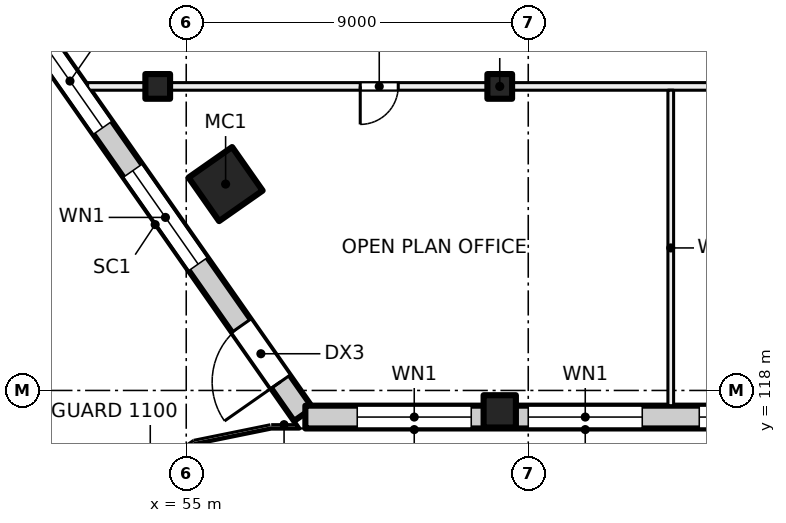
"""IFC4 building model, lengths in metres.
Left out: names, types, materials, properties, quantities, classifications, styles, units other than length and angle.
Written with IfcOpenShell. Run it as: python <this file> out.ifc"""

import sys

from ifc_helpers import new_model, si_unit, direction, frame, frame_2d, origin, origin_2d, place, context, subcontext, project, spatial, rectangle, hollow_rectangle, extrude, element, fill, save


model = new_model("IFC4")
c1 = context("Model", 3, precision=1e-05, world=origin(), true_north=direction((0.0, 1.0)))
c2 = subcontext(c1, "Body", "Model", "MODEL_VIEW")
j1 = project(units=[si_unit("LENGTHUNIT", "METRE"), si_unit("PLANEANGLEUNIT", "RADIAN")], contexts=[c1])
p1 = place(None, origin())
s1 = spatial("IfcSite", under=j1, at=p1, CompositionType="ELEMENT")
p2 = place(p1, origin())
s2 = spatial("IfcBuilding", under=s1, at=p2, CompositionType="ELEMENT")
p3 = place(p2, frame((0.0, 0.0, 105.0)))
s3 = spatial("IfcBuildingStorey", under=s2, at=p3, CompositionType="ELEMENT", Elevation=105.0)
p4 = place(p3, frame((56.036, 123.43, 0.0), z_axis=(0.0, 0.0, 1.0), x_axis=(0.573576436351, -0.819152044289, 0.0)))
e1 = element("IfcColumn", 1, at=p4, inside=s3, PredefinedType="COLUMN", context=c2, shape_type="SweptSolid", body=[
    extrude(hollow_rectangle(XDim=1.4, YDim=1.4, WallThickness=0.04, at=origin_2d()), origin(), (0.0, 0.0, 1.0), 4.0),
])
for number, where, z_axis, x_axis in (
    (2, (54.25, 126.0, 0.0), (0.0, 0.0, 1.0), (1.0, 0.0, 0.0)),
    (3, (63.25, 126.0, 0.0), (0.0, 0.0, 1.0), (1.0, 0.0, 0.0)),
):
    element("IfcColumn", number, at=place(p3, frame(where, z_axis=z_axis, x_axis=x_axis)), inside=s3, PredefinedType="COLUMN", context=c2, shape_type="SweptSolid", body=[
        extrude(rectangle(XDim=0.65, YDim=0.65, at=origin_2d()), origin(), (0.0, 0.0, 1.0), 4.0),
    ])
p5 = place(p3, frame((63.25, 117.45, 0.0), z_axis=(0.0, 0.0, 1.0), x_axis=(1.0, 0.0, 0.0)))
e4 = element("IfcColumn", 4, at=p5, inside=s3, PredefinedType="COLUMN", context=c2, shape_type="SweptSolid", body=[
    extrude(rectangle(XDim=0.85, YDim=0.85, at=origin_2d()), origin(), (0.0, 0.0, 1.0), 4.0),
])
p6 = place(p3, frame((58.083, 117.369, 0.0), z_axis=(0.0, 0.0, 1.0), x_axis=(-0.573573095716, 0.819154383416, 0.0)))
e5 = element("IfcWall", 5, at=p6, inside=s3, PredefinedType="SOLIDWALL", context=c2, shape_type="SweptSolid", body=[
    extrude(rectangle(XDim=26.037, YDim=0.6, at=frame_2d((13.019, 0.0))), origin(), (0.0, 0.0, 1.0), 3.625),
])
p7 = place(p6, frame((1.05, 0.0, 0.0)))
e6 = element("IfcOpeningElement", 6, at=p7, cuts=e5, PredefinedType="OPENING", context=c2, shape_type="SweptSolid", body=[
    extrude(rectangle(XDim=1.8, YDim=2.4, at=frame_2d((0.9, 1.2))), frame((0.0, 0.31, 0.0), z_axis=(0.0, -1.0, 0.0), x_axis=(1.0, 0.0, 0.0)), (0.0, 0.0, 1.0), 0.62),
])
p8 = place(p6, frame((4.829, 0.0, 0.9)))
e7 = element("IfcOpeningElement", 7, at=p8, cuts=e5, PredefinedType="OPENING", context=c2, shape_type="SweptSolid", body=[
    extrude(rectangle(XDim=3.0, YDim=2.4, at=frame_2d((1.5, 1.2))), frame((0.0, 0.31, 0.0), z_axis=(0.0, -1.0, 0.0), x_axis=(1.0, 0.0, 0.0)), (0.0, 0.0, 1.0), 0.62),
])
p9 = place(p6, frame((9.209, 0.0, 0.9)))
e8 = element("IfcOpeningElement", 8, at=p9, cuts=e5, PredefinedType="OPENING", context=c2, shape_type="SweptSolid", body=[
    extrude(rectangle(XDim=3.0, YDim=2.4, at=frame_2d((1.5, 1.2))), frame((0.0, 0.31, 0.0), z_axis=(0.0, -1.0, 0.0), x_axis=(1.0, 0.0, 0.0)), (0.0, 0.0, 1.0), 0.62),
])
p10 = place(p6, frame((13.588, 0.0, 0.9)))
e9 = element("IfcOpeningElement", 9, at=p10, cuts=e5, PredefinedType="OPENING", context=c2, shape_type="SweptSolid", body=[
    extrude(rectangle(XDim=3.0, YDim=2.4, at=frame_2d((1.5, 1.2))), frame((0.0, 0.31, 0.0), z_axis=(0.0, -1.0, 0.0), x_axis=(1.0, 0.0, 0.0)), (0.0, 0.0, 1.0), 0.62),
])
p11 = place(p6, frame((17.968, 0.0, 0.9)))
e10 = element("IfcOpeningElement", 10, at=p11, cuts=e5, PredefinedType="OPENING", context=c2, shape_type="SweptSolid", body=[
    extrude(rectangle(XDim=3.0, YDim=2.4, at=frame_2d((1.5, 1.2))), frame((0.0, 0.31, 0.0), z_axis=(0.0, -1.0, 0.0), x_axis=(1.0, 0.0, 0.0)), (0.0, 0.0, 1.0), 0.62),
])
p12 = place(p6, frame((22.198, 0.0, 0.9)))
e11 = element("IfcOpeningElement", 11, at=p12, cuts=e5, PredefinedType="OPENING", context=c2, shape_type="SweptSolid", body=[
    extrude(rectangle(XDim=3.0, YDim=2.4, at=frame_2d((1.5, 1.2))), frame((0.0, 0.31, 0.0), z_axis=(0.0, -1.0, 0.0), x_axis=(1.0, 0.0, 0.0)), (0.0, 0.0, 1.0), 0.62),
])
p13 = place(p3, frame((90.98, 117.3, 0.0), z_axis=(0.0, 0.0, 1.0), x_axis=(-1.0, 0.0, 0.0)))
e12 = element("IfcWall", 12, at=p13, inside=s3, PredefinedType="SOLIDWALL", context=c2, shape_type="SweptSolid", body=[
    extrude(rectangle(XDim=32.845, YDim=0.6, at=frame_2d((16.422, 0.0))), origin(), (0.0, 0.0, 1.0), 3.625),
])
p14 = place(p13, frame((1.48, 0.0, 0.9)))
e13 = element("IfcOpeningElement", 13, at=p14, cuts=e12, PredefinedType="OPENING", context=c2, shape_type="SweptSolid", body=[
    extrude(rectangle(XDim=3.0, YDim=2.4, at=frame_2d((1.5, 1.2))), frame((0.0, 0.31, 0.0), z_axis=(0.0, -1.0, 0.0), x_axis=(1.0, 0.0, 0.0)), (0.0, 0.0, 1.0), 0.62),
])
p15 = place(p13, frame((5.98, 0.0, 0.9)))
e14 = element("IfcOpeningElement", 14, at=p15, cuts=e12, PredefinedType="OPENING", context=c2, shape_type="SweptSolid", body=[
    extrude(rectangle(XDim=3.0, YDim=2.4, at=frame_2d((1.5, 1.2))), frame((0.0, 0.31, 0.0), z_axis=(0.0, -1.0, 0.0), x_axis=(1.0, 0.0, 0.0)), (0.0, 0.0, 1.0), 0.62),
])
p16 = place(p13, frame((10.48, 0.0, 0.9)))
e15 = element("IfcOpeningElement", 15, at=p16, cuts=e12, PredefinedType="OPENING", context=c2, shape_type="SweptSolid", body=[
    extrude(rectangle(XDim=3.0, YDim=2.4, at=frame_2d((1.5, 1.2))), frame((0.0, 0.31, 0.0), z_axis=(0.0, -1.0, 0.0), x_axis=(1.0, 0.0, 0.0)), (0.0, 0.0, 1.0), 0.62),
])
p17 = place(p13, frame((14.98, 0.0, 0.9)))
e16 = element("IfcOpeningElement", 16, at=p17, cuts=e12, PredefinedType="OPENING", context=c2, shape_type="SweptSolid", body=[
    extrude(rectangle(XDim=3.0, YDim=2.4, at=frame_2d((1.5, 1.2))), frame((0.0, 0.31, 0.0), z_axis=(0.0, -1.0, 0.0), x_axis=(1.0, 0.0, 0.0)), (0.0, 0.0, 1.0), 0.62),
])
p18 = place(p13, frame((19.48, 0.0, 0.9)))
e17 = element("IfcOpeningElement", 17, at=p18, cuts=e12, PredefinedType="OPENING", context=c2, shape_type="SweptSolid", body=[
    extrude(rectangle(XDim=3.0, YDim=2.4, at=frame_2d((1.5, 1.2))), frame((0.0, 0.31, 0.0), z_axis=(0.0, -1.0, 0.0), x_axis=(1.0, 0.0, 0.0)), (0.0, 0.0, 1.0), 0.62),
])
p19 = place(p13, frame((23.98, 0.0, 0.9)))
e18 = element("IfcOpeningElement", 18, at=p19, cuts=e12, PredefinedType="OPENING", context=c2, shape_type="SweptSolid", body=[
    extrude(rectangle(XDim=3.0, YDim=2.4, at=frame_2d((1.5, 1.2))), frame((0.0, 0.31, 0.0), z_axis=(0.0, -1.0, 0.0), x_axis=(1.0, 0.0, 0.0)), (0.0, 0.0, 1.0), 0.62),
])
p20 = place(p13, frame((28.48, 0.0, 0.9)))
e19 = element("IfcOpeningElement", 19, at=p20, cuts=e12, PredefinedType="OPENING", context=c2, shape_type="SweptSolid", body=[
    extrude(rectangle(XDim=3.0, YDim=2.4, at=frame_2d((1.5, 1.2))), frame((0.0, 0.31, 0.0), z_axis=(0.0, -1.0, 0.0), x_axis=(1.0, 0.0, 0.0)), (0.0, 0.0, 1.0), 0.62),
])
p21 = place(p3, frame((36.923, 134.338, 0.0), z_axis=(0.0, 0.0, 1.0), x_axis=(0.573575266068, -0.819152863729, 0.0)))
e20 = element("IfcWall", 20, at=p21, inside=s3, PredefinedType="SOLIDWALL", context=c2, shape_type="SweptSolid", body=[
    extrude(rectangle(XDim=26.117, YDim=0.6, at=frame_2d((13.059, 0.0))), origin(), (0.0, 0.0, 1.0), 3.625),
])
p22 = place(p21, frame((0.84, 0.0, 0.9)))
e21 = element("IfcOpeningElement", 21, at=p22, cuts=e20, PredefinedType="OPENING", context=c2, shape_type="SweptSolid", body=[
    extrude(rectangle(XDim=3.0, YDim=2.4, at=frame_2d((1.5, 1.2))), frame((0.0, 0.31, 0.0), z_axis=(0.0, -1.0, 0.0), x_axis=(1.0, 0.0, 0.0)), (0.0, 0.0, 1.0), 0.62),
])
p23 = place(p21, frame((5.669, 0.0, 0.0)))
e22 = element("IfcOpeningElement", 22, at=p23, cuts=e20, PredefinedType="OPENING", context=c2, shape_type="SweptSolid", body=[
    extrude(rectangle(XDim=1.8, YDim=2.4, at=frame_2d((0.9, 1.2))), frame((0.0, 0.31, 0.0), z_axis=(0.0, -1.0, 0.0), x_axis=(1.0, 0.0, 0.0)), (0.0, 0.0, 1.0), 0.62),
])
p24 = place(p21, frame((9.449, 0.0, 0.9)))
e23 = element("IfcOpeningElement", 23, at=p24, cuts=e20, PredefinedType="OPENING", context=c2, shape_type="SweptSolid", body=[
    extrude(rectangle(XDim=3.0, YDim=2.4, at=frame_2d((1.5, 1.2))), frame((0.0, 0.31, 0.0), z_axis=(0.0, -1.0, 0.0), x_axis=(1.0, 0.0, 0.0)), (0.0, 0.0, 1.0), 0.62),
])
p25 = place(p21, frame((13.829, 0.0, 0.9)))
e24 = element("IfcOpeningElement", 24, at=p25, cuts=e20, PredefinedType="OPENING", context=c2, shape_type="SweptSolid", body=[
    extrude(rectangle(XDim=3.0, YDim=2.4, at=frame_2d((1.5, 1.2))), frame((0.0, 0.31, 0.0), z_axis=(0.0, -1.0, 0.0), x_axis=(1.0, 0.0, 0.0)), (0.0, 0.0, 1.0), 0.62),
])
p26 = place(p21, frame((18.208, 0.0, 0.9)))
e25 = element("IfcOpeningElement", 25, at=p26, cuts=e20, PredefinedType="OPENING", context=c2, shape_type="SweptSolid", body=[
    extrude(rectangle(XDim=3.0, YDim=2.4, at=frame_2d((1.5, 1.2))), frame((0.0, 0.31, 0.0), z_axis=(0.0, -1.0, 0.0), x_axis=(1.0, 0.0, 0.0)), (0.0, 0.0, 1.0), 0.62),
])
p27 = place(p21, frame((22.438, 0.0, 0.9)))
e26 = element("IfcOpeningElement", 26, at=p27, cuts=e20, PredefinedType="OPENING", context=c2, shape_type="SweptSolid", body=[
    extrude(rectangle(XDim=3.0, YDim=2.4, at=frame_2d((1.5, 1.2))), frame((0.0, 0.31, 0.0), z_axis=(0.0, -1.0, 0.0), x_axis=(1.0, 0.0, 0.0)), (0.0, 0.0, 1.0), 0.62),
])
p28 = place(p3, frame((91.0, 126.0, 0.0), z_axis=(0.0, 0.0, 1.0), x_axis=(-1.0, 0.0, 0.0)))
e27 = element("IfcWall", 27, at=p28, inside=s3, PredefinedType="PARTITIONING", context=c2, shape_type="SweptSolid", body=[
    extrude(rectangle(XDim=38.595, YDim=0.2, at=frame_2d((19.297, 0.0))), origin(), (0.0, 0.0, 1.0), 3.625),
])
p29 = place(p28, frame((30.421, 0.0, 0.0)))
e28 = element("IfcOpeningElement", 28, at=p29, cuts=e27, PredefinedType="OPENING", context=c2, shape_type="SweptSolid", body=[
    extrude(rectangle(XDim=1.0, YDim=2.1, at=frame_2d((0.5, 1.05))), frame((0.0, 0.11, 0.0), z_axis=(0.0, -1.0, 0.0), x_axis=(1.0, 0.0, 0.0)), (0.0, 0.0, 1.0), 0.22),
])
p30 = place(p28, frame((20.5, 0.0, 0.0)))
e29 = element("IfcOpeningElement", 29, at=p30, cuts=e27, PredefinedType="OPENING", context=c2, shape_type="SweptSolid", body=[
    extrude(rectangle(XDim=1.0, YDim=2.1, at=frame_2d((0.5, 1.05))), frame((0.0, 0.11, 0.0), z_axis=(0.0, -1.0, 0.0), x_axis=(1.0, 0.0, 0.0)), (0.0, 0.0, 1.0), 0.22),
])
p31 = place(p28, frame((13.75, 0.0, 0.0)))
e30 = element("IfcOpeningElement", 30, at=p31, cuts=e27, PredefinedType="OPENING", context=c2, shape_type="SweptSolid", body=[
    extrude(rectangle(XDim=1.0, YDim=2.1, at=frame_2d((0.5, 1.05))), frame((0.0, 0.11, 0.0), z_axis=(0.0, -1.0, 0.0), x_axis=(1.0, 0.0, 0.0)), (0.0, 0.0, 1.0), 0.22),
])
p32 = place(p28, frame((4.377, 0.0, 0.0)))
e31 = element("IfcOpeningElement", 31, at=p32, cuts=e27, PredefinedType="OPENING", context=c2, shape_type="SweptSolid", body=[
    extrude(rectangle(XDim=1.0, YDim=2.1, at=frame_2d((0.5, 1.05))), frame((0.0, 0.11, 0.0), z_axis=(0.0, -1.0, 0.0), x_axis=(1.0, 0.0, 0.0)), (0.0, 0.0, 1.0), 0.22),
])
p33 = place(p3, frame((67.75, 117.6, 0.0), z_axis=(0.0, 0.0, 1.0), x_axis=(0.0, 1.0, 0.0)))
e32 = element("IfcWall", 32, at=p33, inside=s3, PredefinedType="PARTITIONING", context=c2, shape_type="SweptSolid", body=[
    extrude(rectangle(XDim=8.3, YDim=0.15, at=frame_2d((4.15, 0.0))), origin(), (0.0, 0.0, 1.0), 3.625),
])
p34 = place(p7, origin())
e33 = element("IfcDoor", 33, at=p34, inside=s3, OperationType="DOUBLE_DOOR_SINGLE_SWING", PredefinedType="DOOR", context=c2, shape_type="SweptSolid", body=[
    extrude(rectangle(XDim=1.8, YDim=2.4, at=frame_2d((0.9, 1.2))), frame((0.0, 0.025, 0.0), z_axis=(0.0, -1.0, 0.0), x_axis=(1.0, 0.0, 0.0)), (0.0, 0.0, 1.0), 0.05),
])
fill(e6, e33)
p35 = place(p8, origin())
e34 = element("IfcWindow", 34, at=p35, inside=s3, PartitioningType="SINGLE_PANEL", PredefinedType="WINDOW", context=c2, shape_type="SweptSolid", body=[
    extrude(rectangle(XDim=3.0, YDim=2.4, at=frame_2d((1.5, 1.2))), frame((0.0, 0.03, 0.0), z_axis=(0.0, -1.0, 0.0), x_axis=(1.0, 0.0, 0.0)), (0.0, 0.0, 1.0), 0.06),
])
fill(e7, e34)
p36 = place(p9, origin())
e35 = element("IfcWindow", 35, at=p36, inside=s3, PartitioningType="SINGLE_PANEL", PredefinedType="WINDOW", context=c2, shape_type="SweptSolid", body=[
    extrude(rectangle(XDim=3.0, YDim=2.4, at=frame_2d((1.5, 1.2))), frame((0.0, 0.03, 0.0), z_axis=(0.0, -1.0, 0.0), x_axis=(1.0, 0.0, 0.0)), (0.0, 0.0, 1.0), 0.06),
])
fill(e8, e35)
p37 = place(p18, origin())
e36 = element("IfcWindow", 36, at=p37, inside=s3, PartitioningType="SINGLE_PANEL", PredefinedType="WINDOW", context=c2, shape_type="SweptSolid", body=[
    extrude(rectangle(XDim=3.0, YDim=2.4, at=frame_2d((1.5, 1.2))), frame((0.0, 0.03, 0.0), z_axis=(0.0, -1.0, 0.0), x_axis=(1.0, 0.0, 0.0)), (0.0, 0.0, 1.0), 0.06),
])
fill(e17, e36)
p38 = place(p19, origin())
e37 = element("IfcWindow", 37, at=p38, inside=s3, PartitioningType="SINGLE_PANEL", PredefinedType="WINDOW", context=c2, shape_type="SweptSolid", body=[
    extrude(rectangle(XDim=3.0, YDim=2.4, at=frame_2d((1.5, 1.2))), frame((0.0, 0.03, 0.0), z_axis=(0.0, -1.0, 0.0), x_axis=(1.0, 0.0, 0.0)), (0.0, 0.0, 1.0), 0.06),
])
fill(e18, e37)
p39 = place(p20, origin())
e38 = element("IfcWindow", 38, at=p39, inside=s3, PartitioningType="SINGLE_PANEL", PredefinedType="WINDOW", context=c2, shape_type="SweptSolid", body=[
    extrude(rectangle(XDim=3.0, YDim=2.4, at=frame_2d((1.5, 1.2))), frame((0.0, 0.03, 0.0), z_axis=(0.0, -1.0, 0.0), x_axis=(1.0, 0.0, 0.0)), (0.0, 0.0, 1.0), 0.06),
])
fill(e19, e38)
p40 = place(p29, origin())
e39 = element("IfcDoor", 39, at=p40, inside=s3, OperationType="SINGLE_SWING_RIGHT", PredefinedType="DOOR", context=c2, shape_type="SweptSolid", body=[
    extrude(rectangle(XDim=1.0, YDim=2.1, at=frame_2d((0.5, 1.05))), frame((0.0, 0.025, 0.0), z_axis=(0.0, -1.0, 0.0), x_axis=(1.0, 0.0, 0.0)), (0.0, 0.0, 1.0), 0.05),
])
fill(e28, e39)
save(model, sys.argv[1])
